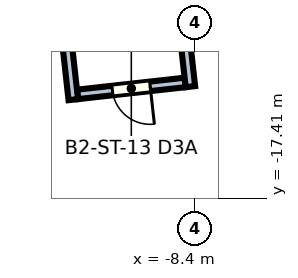
"""IFC4 building model, lengths in metres.
Left out: names, types, materials, properties, quantities, classifications, styles, units other than length and angle.
Written with IfcOpenShell. Run it as: python <this file> out.ifc"""

import sys

from ifc_helpers import new_model, si_unit, direction, frame, frame_2d, origin, place, context, subcontext, project, spatial, rectangle, extrude, element, fill, save


model = new_model("IFC4")
c1 = context("Model", 3, precision=1e-05, world=origin(), true_north=direction((0.0, 1.0)))
c2 = subcontext(c1, "Body", "Model", "MODEL_VIEW")
j1 = project(units=[si_unit("LENGTHUNIT", "METRE"), si_unit("PLANEANGLEUNIT", "RADIAN")], contexts=[c1])
p1 = place(None, origin())
s1 = spatial("IfcSite", under=j1, at=p1, CompositionType="ELEMENT")
p2 = place(p1, origin())
s2 = spatial("IfcBuilding", under=s1, at=p2, CompositionType="ELEMENT")
p3 = place(p2, frame((0.0, 0.0, -9.0)))
s3 = spatial("IfcBuildingStorey", under=s2, at=p3, CompositionType="ELEMENT", Elevation=-9.0)
p4 = place(p3, frame((-8.667, -14.3, 0.0), z_axis=(0.0, 0.0, 1.0), x_axis=(-0.993904609394, -0.110243491536, 0.0)))
e1 = element("IfcWall", 1, at=p4, inside=s3, PredefinedType="SOLIDWALL", context=c2, shape_type="SweptSolid", body=[
    extrude(rectangle(XDim=2.85, YDim=0.25, at=frame_2d((1.425, 0.0))), origin(), (0.0, 0.0, 1.0), 3.7),
])
p5 = place(p4, frame((0.925, 0.0, 0.0)))
e2 = element("IfcOpeningElement", 2, at=p5, cuts=e1, PredefinedType="OPENING", context=c2, shape_type="SweptSolid", body=[
    extrude(rectangle(XDim=1.0, YDim=2.1, at=frame_2d((0.5, 1.05))), frame((0.0, 0.135, 0.0), z_axis=(0.0, -1.0, 0.0), x_axis=(1.0, 0.0, 0.0)), (0.0, 0.0, 1.0), 0.27),
])
p6 = place(p3, frame((-11.61, -14.753, 0.0), z_axis=(0.0, 0.0, 1.0), x_axis=(-0.110310943534, 0.993897125329, 0.0)))
e3 = element("IfcWall", 3, at=p6, inside=s3, PredefinedType="SOLIDWALL", context=c2, shape_type="SweptSolid", body=[
    extrude(rectangle(XDim=6.0, YDim=0.25, at=frame_2d((3.0, 0.0))), origin(), (0.0, 0.0, 1.0), 3.7),
])
p7 = place(p3, frame((-9.22, -8.178, 0.0), z_axis=(0.0, 0.0, 1.0), x_axis=(0.110299055694, -0.993898444668, 0.0)))
e4 = element("IfcWall", 4, at=p7, inside=s3, PredefinedType="SOLIDWALL", context=c2, shape_type="SweptSolid", body=[
    extrude(rectangle(XDim=6.271, YDim=0.25, at=frame_2d((3.135, 0.0))), origin(), (0.0, 0.0, 1.0), 3.7),
])
p8 = place(p5, origin())
e5 = element("IfcDoor", 5, at=p8, inside=s3, PredefinedType="DOOR", context=c2, shape_type="SweptSolid", body=[
    extrude(rectangle(XDim=1.0, YDim=2.1, at=frame_2d((0.5, 1.05))), frame((0.0, 0.025, 0.0), z_axis=(0.0, -1.0, 0.0), x_axis=(1.0, 0.0, 0.0)), (0.0, 0.0, 1.0), 0.05),
])
fill(e2, e5)
save(model, sys.argv[1])
